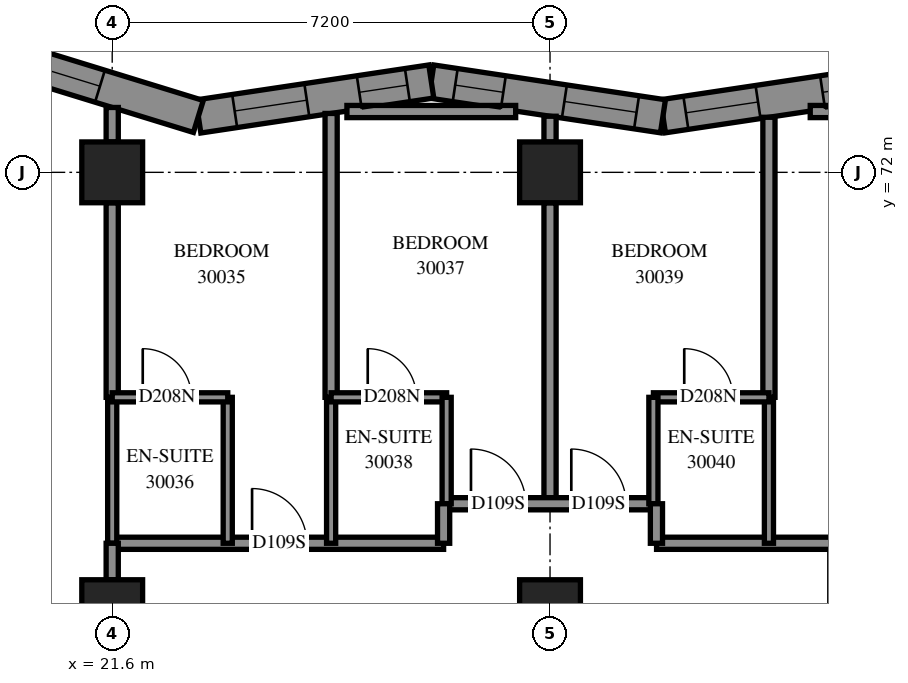
"""IFC4 building model, lengths in metres.
Left out: names, types, materials, properties, quantities, classifications, styles, units other than length and angle.
Written with IfcOpenShell. Run it as: python <this file> out.ifc"""

import sys

from ifc_helpers import new_model, si_unit, direction, frame, frame_2d, origin, origin_2d, place, context, subcontext, project, spatial, polyline, rectangle, outline, extrude, element, fill, save


model = new_model("IFC4")
c1 = context("Model", 3, precision=1e-05, world=origin(), true_north=direction((0.0, 1.0)))
c2 = subcontext(c1, "Body", "Model", "MODEL_VIEW")
j1 = project(units=[si_unit("LENGTHUNIT", "METRE"), si_unit("PLANEANGLEUNIT", "RADIAN")], contexts=[c1])
p1 = place(None, origin())
s1 = spatial("IfcSite", under=j1, at=p1, CompositionType="ELEMENT")
p2 = place(p1, origin())
s2 = spatial("IfcBuilding", under=s1, at=p2, CompositionType="ELEMENT")
p3 = place(p2, frame((0.0, 0.0, 111.8)))
s3 = spatial("IfcBuildingStorey", under=s2, at=p3, CompositionType="ELEMENT", Elevation=111.8)
for number, where, z_axis, x_axis in (
    (1, (21.6, 64.8, 0.0), (0.0, 0.0, 1.0), (1.0, 0.0, 0.0)),
    (2, (21.6, 72.0, 0.0), (0.0, 0.0, 1.0), (1.0, 0.0, 0.0)),
    (3, (28.8, 64.8, 0.0), (0.0, 0.0, 1.0), (1.0, 0.0, 0.0)),
    (4, (28.8, 72.0, 0.0), (0.0, 0.0, 1.0), (1.0, 0.0, 0.0)),
):
    element("IfcColumn", number, at=place(p3, frame(where, z_axis=z_axis, x_axis=x_axis)), inside=s3, PredefinedType="COLUMN", context=c2, shape_type="SweptSolid", body=[
        extrude(rectangle(XDim=1.0, YDim=1.0, at=origin_2d()), origin(), (0.0, 0.0, 1.0), 3.1),
    ])
p4 = place(p3, frame((34.467, 73.494, 0.0), z_axis=(0.0, 0.0, 1.0), x_axis=(-0.9889150173, -0.1484826202, 0.0)))
e5 = element("IfcWall", 5, at=p4, inside=s3, PredefinedType="SOLIDWALL", context=c2, shape_type="SweptSolid", body=[
    extrude(outline(polyline([(-0.041, -0.275), (3.811, -0.275), (3.894, 0.275), (0.041, 0.275), (-0.041, -0.275)])), origin(), (0.0, 0.0, 1.0), 3.1),
])
p5 = place(p4, frame((2.271, 0.0, 0.5)))
e6 = element("IfcOpeningElement", 6, at=p5, cuts=e5, PredefinedType="OPENING", context=c2, shape_type="SweptSolid", body=[
    extrude(rectangle(XDim=1.2, YDim=2.45, at=frame_2d((0.6, 1.225))), frame((0.0, 0.285, 0.0), z_axis=(0.0, -1.0, 0.0), x_axis=(1.0, 0.0, 0.0)), (0.0, 0.0, 1.0), 0.57),
])
p6 = place(p4, frame((0.398, 0.0, 0.45)))
e7 = element("IfcOpeningElement", 7, at=p6, cuts=e5, PredefinedType="OPENING", context=c2, shape_type="SweptSolid", body=[
    extrude(rectangle(XDim=0.8, YDim=2.5, at=frame_2d((0.4, 1.25))), frame((0.0, 0.285, 0.0), z_axis=(0.0, -1.0, 0.0), x_axis=(1.0, 0.0, 0.0)), (0.0, 0.0, 1.0), 0.57),
])
p7 = place(p3, frame((30.657, 72.922, 0.0), z_axis=(0.0, 0.0, 1.0), x_axis=(-0.9889155896, 0.1484788086, 0.0)))
e8 = element("IfcWall", 8, at=p7, inside=s3, PredefinedType="SOLIDWALL", context=c2, shape_type="SweptSolid", body=[
    extrude(outline(polyline([(0.041, -0.275), (3.894, -0.275), (3.811, 0.275), (-0.041, 0.275), (0.041, -0.275)])), origin(), (0.0, 0.0, 1.0), 3.1),
])
p8 = place(p7, frame((0.439, 0.0, 0.5)))
e9 = element("IfcOpeningElement", 9, at=p8, cuts=e8, PredefinedType="OPENING", context=c2, shape_type="SweptSolid", body=[
    extrude(rectangle(XDim=1.2, YDim=2.45, at=frame_2d((0.6, 1.225))), frame((0.0, 0.285, 0.0), z_axis=(0.0, -1.0, 0.0), x_axis=(1.0, 0.0, 0.0)), (0.0, 0.0, 1.0), 0.57),
])
p9 = place(p7, frame((2.655, 0.0, 0.45)))
e10 = element("IfcOpeningElement", 10, at=p9, cuts=e8, PredefinedType="OPENING", context=c2, shape_type="SweptSolid", body=[
    extrude(rectangle(XDim=0.8, YDim=2.5, at=frame_2d((0.4, 1.25))), frame((0.0, 0.285, 0.0), z_axis=(0.0, -1.0, 0.0), x_axis=(1.0, 0.0, 0.0)), (0.0, 0.0, 1.0), 0.57),
])
p10 = place(p3, frame((26.847, 73.494, 0.0), z_axis=(0.0, 0.0, 1.0), x_axis=(-0.9889175987, -0.1484654269, 0.0)))
e11 = element("IfcWall", 11, at=p10, inside=s3, PredefinedType="SOLIDWALL", context=c2, shape_type="SweptSolid", body=[
    extrude(outline(polyline([(-0.041, -0.275), (3.811, -0.275), (3.936, 0.275), (0.041, 0.275), (-0.041, -0.275)])), origin(), (0.0, 0.0, 1.0), 3.1),
])
p11 = place(p10, frame((2.07, 0.0, 0.5)))
e12 = element("IfcOpeningElement", 12, at=p11, cuts=e11, PredefinedType="OPENING", context=c2, shape_type="SweptSolid", body=[
    extrude(rectangle(XDim=1.2, YDim=2.45, at=frame_2d((0.6, 1.225))), frame((0.0, 0.285, 0.0), z_axis=(0.0, -1.0, 0.0), x_axis=(1.0, 0.0, 0.0)), (0.0, 0.0, 1.0), 0.57),
])
p12 = place(p10, frame((0.398, 0.0, 0.45)))
e13 = element("IfcOpeningElement", 13, at=p12, cuts=e11, PredefinedType="OPENING", context=c2, shape_type="SweptSolid", body=[
    extrude(rectangle(XDim=0.8, YDim=2.5, at=frame_2d((0.4, 1.25))), frame((0.0, 0.285, 0.0), z_axis=(0.0, -1.0, 0.0), x_axis=(1.0, 0.0, 0.0)), (0.0, 0.0, 1.0), 0.57),
])
p13 = place(p3, frame((23.017, 72.919, 0.0), z_axis=(0.0, 0.0, 1.0), x_axis=(-0.9557948878, 0.2940342368, 0.0)))
e14 = element("IfcWall", 14, at=p13, inside=s3, PredefinedType="SOLIDWALL", context=c2, shape_type="SweptSolid", body=[
    extrude(outline(polyline([(0.063, -0.275), (4.048, -0.275), (3.304, 0.275), (-0.063, 0.275), (0.063, -0.275)])), origin(), (0.0, 0.0, 1.0), 3.1),
])
p14 = place(p13, frame((1.693, 0.0, 0.5)))
e15 = element("IfcOpeningElement", 15, at=p14, cuts=e14, PredefinedType="OPENING", context=c2, shape_type="SweptSolid", body=[
    extrude(rectangle(XDim=1.2, YDim=2.45, at=frame_2d((0.6, 1.225))), frame((0.0, 0.285, 0.0), z_axis=(0.0, -1.0, 0.0), x_axis=(1.0, 0.0, 0.0)), (0.0, 0.0, 1.0), 0.57),
])
p15 = place(p3, frame((21.6, 65.9, 0.0), z_axis=(0.0, 0.0, 1.0), x_axis=(1.0, 0.0, 0.0)))
e16 = element("IfcWall", 16, at=p15, inside=s3, PredefinedType="PARTITIONING", context=c2, shape_type="SweptSolid", body=[
    extrude(rectangle(XDim=5.45, YDim=0.2, at=frame_2d((2.725, 0.0))), origin(), (0.0, 0.0, 1.0), 3.1),
])
p16 = place(p15, frame((2.3, 0.0, 0.0)))
e17 = element("IfcOpeningElement", 17, at=p16, cuts=e16, PredefinedType="OPENING", context=c2, shape_type="SweptSolid", body=[
    extrude(rectangle(XDim=0.9, YDim=2.1, at=frame_2d((0.45, 1.05))), frame((0.0, 0.11, 0.0), z_axis=(0.0, -1.0, 0.0), x_axis=(1.0, 0.0, 0.0)), (0.0, 0.0, 1.0), 0.22),
])
p17 = place(p3, frame((28.8, 66.55, 0.0), z_axis=(0.0, 0.0, 1.0), x_axis=(0.0, 1.0, 0.0)))
e18 = element("IfcWall", 18, at=p17, inside=s3, PredefinedType="PARTITIONING", context=c2, shape_type="SweptSolid", body=[
    extrude(rectangle(XDim=4.95, YDim=0.2, at=frame_2d((2.475, 0.0))), origin(), (0.0, 0.0, 1.0), 3.1),
])
p18 = place(p3, frame((25.2, 68.3, 0.0), z_axis=(0.0, 0.0, 1.0), x_axis=(0.0, 1.0, 0.0)))
e19 = element("IfcWall", 19, at=p18, inside=s3, PredefinedType="PARTITIONING", context=c2, shape_type="SweptSolid", body=[
    extrude(rectangle(XDim=4.668, YDim=0.2, at=frame_2d((2.334, 0.0))), origin(), (0.0, 0.0, 1.0), 3.1),
])
p19 = place(p3, frame((32.4, 68.3, 0.0), z_axis=(0.0, 0.0, 1.0), x_axis=(0.0, 1.0, 0.0)))
e20 = element("IfcWall", 20, at=p19, inside=s3, PredefinedType="PARTITIONING", context=c2, shape_type="SweptSolid", body=[
    extrude(rectangle(XDim=4.606, YDim=0.2, at=frame_2d((2.303, 0.0))), origin(), (0.0, 0.0, 1.0), 3.1),
])
p20 = place(p3, frame((27.1, 66.55, 0.0), z_axis=(0.0, 0.0, 1.0), x_axis=(1.0, 0.0, 0.0)))
e21 = element("IfcWall", 21, at=p20, inside=s3, PredefinedType="PARTITIONING", context=c2, shape_type="SweptSolid", body=[
    extrude(rectangle(XDim=3.4, YDim=0.2, at=frame_2d((1.7, 0.0))), origin(), (0.0, 0.0, 1.0), 3.1),
])
p21 = place(p20, frame((0.4, 0.0, 0.0)))
e22 = element("IfcOpeningElement", 22, at=p21, cuts=e21, PredefinedType="OPENING", context=c2, shape_type="SweptSolid", body=[
    extrude(rectangle(XDim=0.9, YDim=2.1, at=frame_2d((0.45, 1.05))), frame((0.0, 0.11, 0.0), z_axis=(0.0, -1.0, 0.0), x_axis=(1.0, 0.0, 0.0)), (0.0, 0.0, 1.0), 0.22),
])
p22 = place(p20, frame((2.05, 0.0, 0.0)))
e23 = element("IfcOpeningElement", 23, at=p22, cuts=e21, PredefinedType="OPENING", context=c2, shape_type="SweptSolid", body=[
    extrude(rectangle(XDim=0.9, YDim=2.1, at=frame_2d((0.45, 1.05))), frame((0.0, 0.11, 0.0), z_axis=(0.0, -1.0, 0.0), x_axis=(1.0, 0.0, 0.0)), (0.0, 0.0, 1.0), 0.22),
])
p23 = place(p3, frame((21.6, 68.3, 0.0), z_axis=(0.0, 0.0, 1.0), x_axis=(0.0, 1.0, 0.0)))
e24 = element("IfcWall", 24, at=p23, inside=s3, PredefinedType="PARTITIONING", context=c2, shape_type="SweptSolid", body=[
    extrude(rectangle(XDim=3.2, YDim=0.2, at=frame_2d((1.6, 0.0))), origin(), (0.0, 0.0, 1.0), 2.6),
])
p24 = place(p3, frame((30.552, 65.9, 0.0), z_axis=(0.0, 0.0, 1.0), x_axis=(1.0, 0.0, 0.0)))
e25 = element("IfcWall", 25, at=p24, inside=s3, PredefinedType="PARTITIONING", context=c2, shape_type="SweptSolid", body=[
    extrude(rectangle(XDim=2.948, YDim=0.2, at=frame_2d((1.474, 0.0))), origin(), (0.0, 0.0, 1.0), 3.1),
])
p25 = place(p3, frame((33.079, 73.0, 0.0), z_axis=(0.0, 0.0, 1.0), x_axis=(1.0, 0.0, 0.0)))
e26 = element("IfcWall", 26, at=p25, inside=s3, PredefinedType="PARTITIONING", context=c2, shape_type="SweptSolid", body=[
    extrude(rectangle(XDim=2.775, YDim=0.2, at=frame_2d((1.388, 0.0))), origin(), (0.0, 0.0, 1.0), 3.1),
])
p26 = place(p3, frame((25.46, 73.0, 0.0), z_axis=(0.0, 0.0, 1.0), x_axis=(1.0, 0.0, 0.0)))
e27 = element("IfcWall", 27, at=p26, inside=s3, PredefinedType="PARTITIONING", context=c2, shape_type="SweptSolid", body=[
    extrude(rectangle(XDim=2.775, YDim=0.2, at=frame_2d((1.387, 0.0))), origin(), (0.0, 0.0, 1.0), 3.1),
])
p27 = place(p3, frame((21.6, 65.9, 0.0), z_axis=(0.0, 0.0, 1.0), x_axis=(0.0, 1.0, 0.0)))
e28 = element("IfcWall", 28, at=p27, inside=s3, PredefinedType="PARTITIONING", context=c2, shape_type="SweptSolid", body=[
    extrude(rectangle(XDim=2.4, YDim=0.15, at=frame_2d((1.2, 0.0))), origin(), (0.0, 0.0, 1.0), 2.6),
])
for number, where, z_axis, x_axis in (
    (29, (23.5, 65.9, 0.0), (0.0, 0.0, 1.0), (0.0, 1.0, 0.0)),
    (30, (25.2, 65.9, 0.0), (0.0, 0.0, 1.0), (0.0, 1.0, 0.0)),
    (31, (32.4, 65.9, 0.0), (0.0, 0.0, 1.0), (0.0, 1.0, 0.0)),
):
    element("IfcWall", number, at=place(p3, frame(where, z_axis=z_axis, x_axis=x_axis)), inside=s3, PredefinedType="PARTITIONING", context=c2, shape_type="SweptSolid", body=[
        extrude(rectangle(XDim=2.4, YDim=0.15, at=frame_2d((1.2, 0.0))), origin(), (0.0, 0.0, 1.0), 3.1),
    ])
p28 = place(p3, frame((25.2, 68.3, 0.0), z_axis=(0.0, 0.0, 1.0), x_axis=(1.0, 0.0, 0.0)))
e32 = element("IfcWall", 32, at=p28, inside=s3, PredefinedType="PARTITIONING", context=c2, shape_type="SweptSolid", body=[
    extrude(rectangle(XDim=1.9, YDim=0.15, at=frame_2d((0.95, 0.0))), origin(), (0.0, 0.0, 1.0), 3.1),
])
p29 = place(p28, frame((0.602, 0.0, 0.0)))
e33 = element("IfcOpeningElement", 33, at=p29, cuts=e32, PredefinedType="OPENING", context=c2, shape_type="SweptSolid", body=[
    extrude(rectangle(XDim=0.8, YDim=2.1, at=frame_2d((0.4, 1.05))), frame((0.0, 0.085, 0.0), z_axis=(0.0, -1.0, 0.0), x_axis=(1.0, 0.0, 0.0)), (0.0, 0.0, 1.0), 0.17),
])
p30 = place(p3, frame((21.6, 68.3, 0.0), z_axis=(0.0, 0.0, 1.0), x_axis=(1.0, 0.0, 0.0)))
e34 = element("IfcWall", 34, at=p30, inside=s3, PredefinedType="PARTITIONING", context=c2, shape_type="SweptSolid", body=[
    extrude(rectangle(XDim=1.9, YDim=0.15, at=frame_2d((0.95, 0.0))), origin(), (0.0, 0.0, 1.0), 3.1),
])
p31 = place(p30, frame((0.502, 0.0, 0.0)))
e35 = element("IfcOpeningElement", 35, at=p31, cuts=e34, PredefinedType="OPENING", context=c2, shape_type="SweptSolid", body=[
    extrude(rectangle(XDim=0.8, YDim=2.1, at=frame_2d((0.4, 1.05))), frame((0.0, 0.085, 0.0), z_axis=(0.0, -1.0, 0.0), x_axis=(1.0, 0.0, 0.0)), (0.0, 0.0, 1.0), 0.17),
])
p32 = place(p3, frame((30.5, 68.3, 0.0), z_axis=(0.0, 0.0, 1.0), x_axis=(1.0, 0.0, 0.0)))
e36 = element("IfcWall", 36, at=p32, inside=s3, PredefinedType="PARTITIONING", context=c2, shape_type="SweptSolid", body=[
    extrude(rectangle(XDim=1.9, YDim=0.15, at=frame_2d((0.95, 0.0))), origin(), (0.0, 0.0, 1.0), 3.1),
])
p33 = place(p32, frame((0.507, 0.0, 0.0)))
e37 = element("IfcOpeningElement", 37, at=p33, cuts=e36, PredefinedType="OPENING", context=c2, shape_type="SweptSolid", body=[
    extrude(rectangle(XDim=0.8, YDim=2.1, at=frame_2d((0.4, 1.05))), frame((0.0, 0.085, 0.0), z_axis=(0.0, -1.0, 0.0), x_axis=(1.0, 0.0, 0.0)), (0.0, 0.0, 1.0), 0.17),
])
for number, where, z_axis, x_axis in (
    (38, (27.1, 66.55, 0.0), (0.0, 0.0, 1.0), (0.0, 1.0, 0.0)),
    (39, (30.5, 66.55, 0.0), (0.0, 0.0, 1.0), (0.0, 1.0, 0.0)),
):
    element("IfcWall", number, at=place(p3, frame(where, z_axis=z_axis, x_axis=x_axis)), inside=s3, PredefinedType="PARTITIONING", context=c2, shape_type="SweptSolid", body=[
        extrude(rectangle(XDim=1.75, YDim=0.15, at=frame_2d((0.875, 0.0))), origin(), (0.0, 0.0, 1.0), 3.1),
    ])
for number, where, z_axis, x_axis in (
    (40, (27.05, 65.9, 0.0), (0.0, 0.0, 1.0), (0.0, 1.0, 0.0)),
    (41, (30.55, 65.9, 0.0), (0.0, 0.0, 1.0), (0.0, 1.0, 0.0)),
):
    element("IfcWall", number, at=place(p3, frame(where, z_axis=z_axis, x_axis=x_axis)), inside=s3, PredefinedType="PARTITIONING", context=c2, shape_type="SweptSolid", body=[
        extrude(rectangle(XDim=0.65, YDim=0.2, at=frame_2d((0.325, 0.0))), origin(), (0.0, 0.0, 1.0), 3.1),
    ])
p34 = place(p3, frame((21.6, 65.3, 0.0), z_axis=(0.0, 0.0, 1.0), x_axis=(0.0, 1.0, 0.0)))
e42 = element("IfcWall", 42, at=p34, inside=s3, PredefinedType="PARTITIONING", context=c2, shape_type="SweptSolid", body=[
    extrude(rectangle(XDim=0.6, YDim=0.2, at=frame_2d((0.3, 0.0))), origin(), (0.0, 0.0, 1.0), 2.6),
])
p35 = place(p3, frame((21.6, 72.5, 0.0), z_axis=(0.0, 0.0, 1.0), x_axis=(0.0, 1.0, 0.0)))
e43 = element("IfcWall", 43, at=p35, inside=s3, PredefinedType="PARTITIONING", context=c2, shape_type="SweptSolid", body=[
    extrude(rectangle(XDim=0.567, YDim=0.2, at=frame_2d((0.283, 0.0))), origin(), (0.0, 0.0, 1.0), 3.1),
])
p36 = place(p3, frame((28.8, 72.5, 0.0), z_axis=(0.0, 0.0, 1.0), x_axis=(0.0, 1.0, 0.0)))
e44 = element("IfcWall", 44, at=p36, inside=s3, PredefinedType="PARTITIONING", context=c2, shape_type="SweptSolid", body=[
    extrude(rectangle(XDim=0.423, YDim=0.2, at=frame_2d((0.211, 0.0))), origin(), (0.0, 0.0, 1.0), 3.1),
])
p37 = place(p5, origin())
e45 = element("IfcWindow", 45, at=p37, inside=s3, PartitioningType="SINGLE_PANEL", PredefinedType="WINDOW", context=c2, shape_type="SweptSolid", body=[
    extrude(rectangle(XDim=1.2, YDim=2.45, at=frame_2d((0.6, 1.225))), frame((0.0, 0.155, 0.0), z_axis=(0.0, -1.0, 0.0), x_axis=(1.0, 0.0, 0.0)), (0.0, 0.0, 1.0), 0.06),
])
fill(e6, e45)
p38 = place(p8, origin())
e46 = element("IfcWindow", 46, at=p38, inside=s3, PartitioningType="SINGLE_PANEL", PredefinedType="WINDOW", context=c2, shape_type="SweptSolid", body=[
    extrude(rectangle(XDim=1.2, YDim=2.45, at=frame_2d((0.6, 1.225))), frame((0.0, 0.155, 0.0), z_axis=(0.0, -1.0, 0.0), x_axis=(1.0, 0.0, 0.0)), (0.0, 0.0, 1.0), 0.06),
])
fill(e9, e46)
p39 = place(p11, origin())
e47 = element("IfcWindow", 47, at=p39, inside=s3, PartitioningType="SINGLE_PANEL", PredefinedType="WINDOW", context=c2, shape_type="SweptSolid", body=[
    extrude(rectangle(XDim=1.2, YDim=2.45, at=frame_2d((0.6, 1.225))), frame((0.0, 0.155, 0.0), z_axis=(0.0, -1.0, 0.0), x_axis=(1.0, 0.0, 0.0)), (0.0, 0.0, 1.0), 0.06),
])
fill(e12, e47)
p40 = place(p14, origin())
e48 = element("IfcWindow", 48, at=p40, inside=s3, PartitioningType="SINGLE_PANEL", PredefinedType="WINDOW", context=c2, shape_type="SweptSolid", body=[
    extrude(rectangle(XDim=1.2, YDim=2.45, at=frame_2d((0.6, 1.225))), frame((0.0, 0.155, 0.0), z_axis=(0.0, -1.0, 0.0), x_axis=(1.0, 0.0, 0.0)), (0.0, 0.0, 1.0), 0.06),
])
fill(e15, e48)
p41 = place(p16, origin())
e49 = element("IfcDoor", 49, at=p41, inside=s3, OperationType="SINGLE_SWING_RIGHT", PredefinedType="DOOR", context=c2, shape_type="SweptSolid", body=[
    extrude(rectangle(XDim=0.9, YDim=2.1, at=frame_2d((0.45, 1.05))), frame((0.0, 0.025, 0.0), z_axis=(0.0, -1.0, 0.0), x_axis=(1.0, 0.0, 0.0)), (0.0, 0.0, 1.0), 0.05),
])
fill(e17, e49)
p42 = place(p31, origin())
e50 = element("IfcDoor", 50, at=p42, inside=s3, OperationType="SINGLE_SWING_RIGHT", PredefinedType="DOOR", context=c2, shape_type="SweptSolid", body=[
    extrude(rectangle(XDim=0.8, YDim=2.1, at=frame_2d((0.4, 1.05))), frame((0.0, 0.025, 0.0), z_axis=(0.0, -1.0, 0.0), x_axis=(1.0, 0.0, 0.0)), (0.0, 0.0, 1.0), 0.05),
])
fill(e35, e50)
p43 = place(p21, origin())
e51 = element("IfcDoor", 51, at=p43, inside=s3, OperationType="SINGLE_SWING_LEFT", PredefinedType="DOOR", context=c2, shape_type="SweptSolid", body=[
    extrude(rectangle(XDim=0.9, YDim=2.1, at=frame_2d((0.45, 1.05))), frame((0.0, 0.025, 0.0), z_axis=(0.0, -1.0, 0.0), x_axis=(1.0, 0.0, 0.0)), (0.0, 0.0, 1.0), 0.05),
])
fill(e22, e51)
p44 = place(p29, origin())
e52 = element("IfcDoor", 52, at=p44, inside=s3, OperationType="SINGLE_SWING_RIGHT", PredefinedType="DOOR", context=c2, shape_type="SweptSolid", body=[
    extrude(rectangle(XDim=0.8, YDim=2.1, at=frame_2d((0.4, 1.05))), frame((0.0, 0.025, 0.0), z_axis=(0.0, -1.0, 0.0), x_axis=(1.0, 0.0, 0.0)), (0.0, 0.0, 1.0), 0.05),
])
fill(e33, e52)
p45 = place(p22, origin())
e53 = element("IfcDoor", 53, at=p45, inside=s3, OperationType="SINGLE_SWING_RIGHT", PredefinedType="DOOR", context=c2, shape_type="SweptSolid", body=[
    extrude(rectangle(XDim=0.9, YDim=2.1, at=frame_2d((0.45, 1.05))), frame((0.0, 0.025, 0.0), z_axis=(0.0, -1.0, 0.0), x_axis=(1.0, 0.0, 0.0)), (0.0, 0.0, 1.0), 0.05),
])
fill(e23, e53)
p46 = place(p33, origin())
e54 = element("IfcDoor", 54, at=p46, inside=s3, OperationType="SINGLE_SWING_RIGHT", PredefinedType="DOOR", context=c2, shape_type="SweptSolid", body=[
    extrude(rectangle(XDim=0.8, YDim=2.1, at=frame_2d((0.4, 1.05))), frame((0.0, 0.025, 0.0), z_axis=(0.0, -1.0, 0.0), x_axis=(1.0, 0.0, 0.0)), (0.0, 0.0, 1.0), 0.05),
])
fill(e37, e54)
p47 = place(p6, origin())
e55 = element("IfcWindow", 55, at=p47, inside=s3, PartitioningType="SINGLE_PANEL", PredefinedType="WINDOW", context=c2, shape_type="SweptSolid", body=[
    extrude(rectangle(XDim=0.8, YDim=2.5, at=frame_2d((0.4, 1.25))), frame((0.0, 0.155, 0.0), z_axis=(0.0, -1.0, 0.0), x_axis=(1.0, 0.0, 0.0)), (0.0, 0.0, 1.0), 0.06),
])
fill(e7, e55)
p48 = place(p9, origin())
e56 = element("IfcWindow", 56, at=p48, inside=s3, PartitioningType="SINGLE_PANEL", PredefinedType="WINDOW", context=c2, shape_type="SweptSolid", body=[
    extrude(rectangle(XDim=0.8, YDim=2.5, at=frame_2d((0.4, 1.25))), frame((0.0, 0.155, 0.0), z_axis=(0.0, -1.0, 0.0), x_axis=(1.0, 0.0, 0.0)), (0.0, 0.0, 1.0), 0.06),
])
fill(e10, e56)
p49 = place(p12, origin())
e57 = element("IfcWindow", 57, at=p49, inside=s3, PartitioningType="SINGLE_PANEL", PredefinedType="WINDOW", context=c2, shape_type="SweptSolid", body=[
    extrude(rectangle(XDim=0.8, YDim=2.5, at=frame_2d((0.4, 1.25))), frame((0.0, 0.155, 0.0), z_axis=(0.0, -1.0, 0.0), x_axis=(1.0, 0.0, 0.0)), (0.0, 0.0, 1.0), 0.06),
])
fill(e13, e57)
save(model, sys.argv[1])
